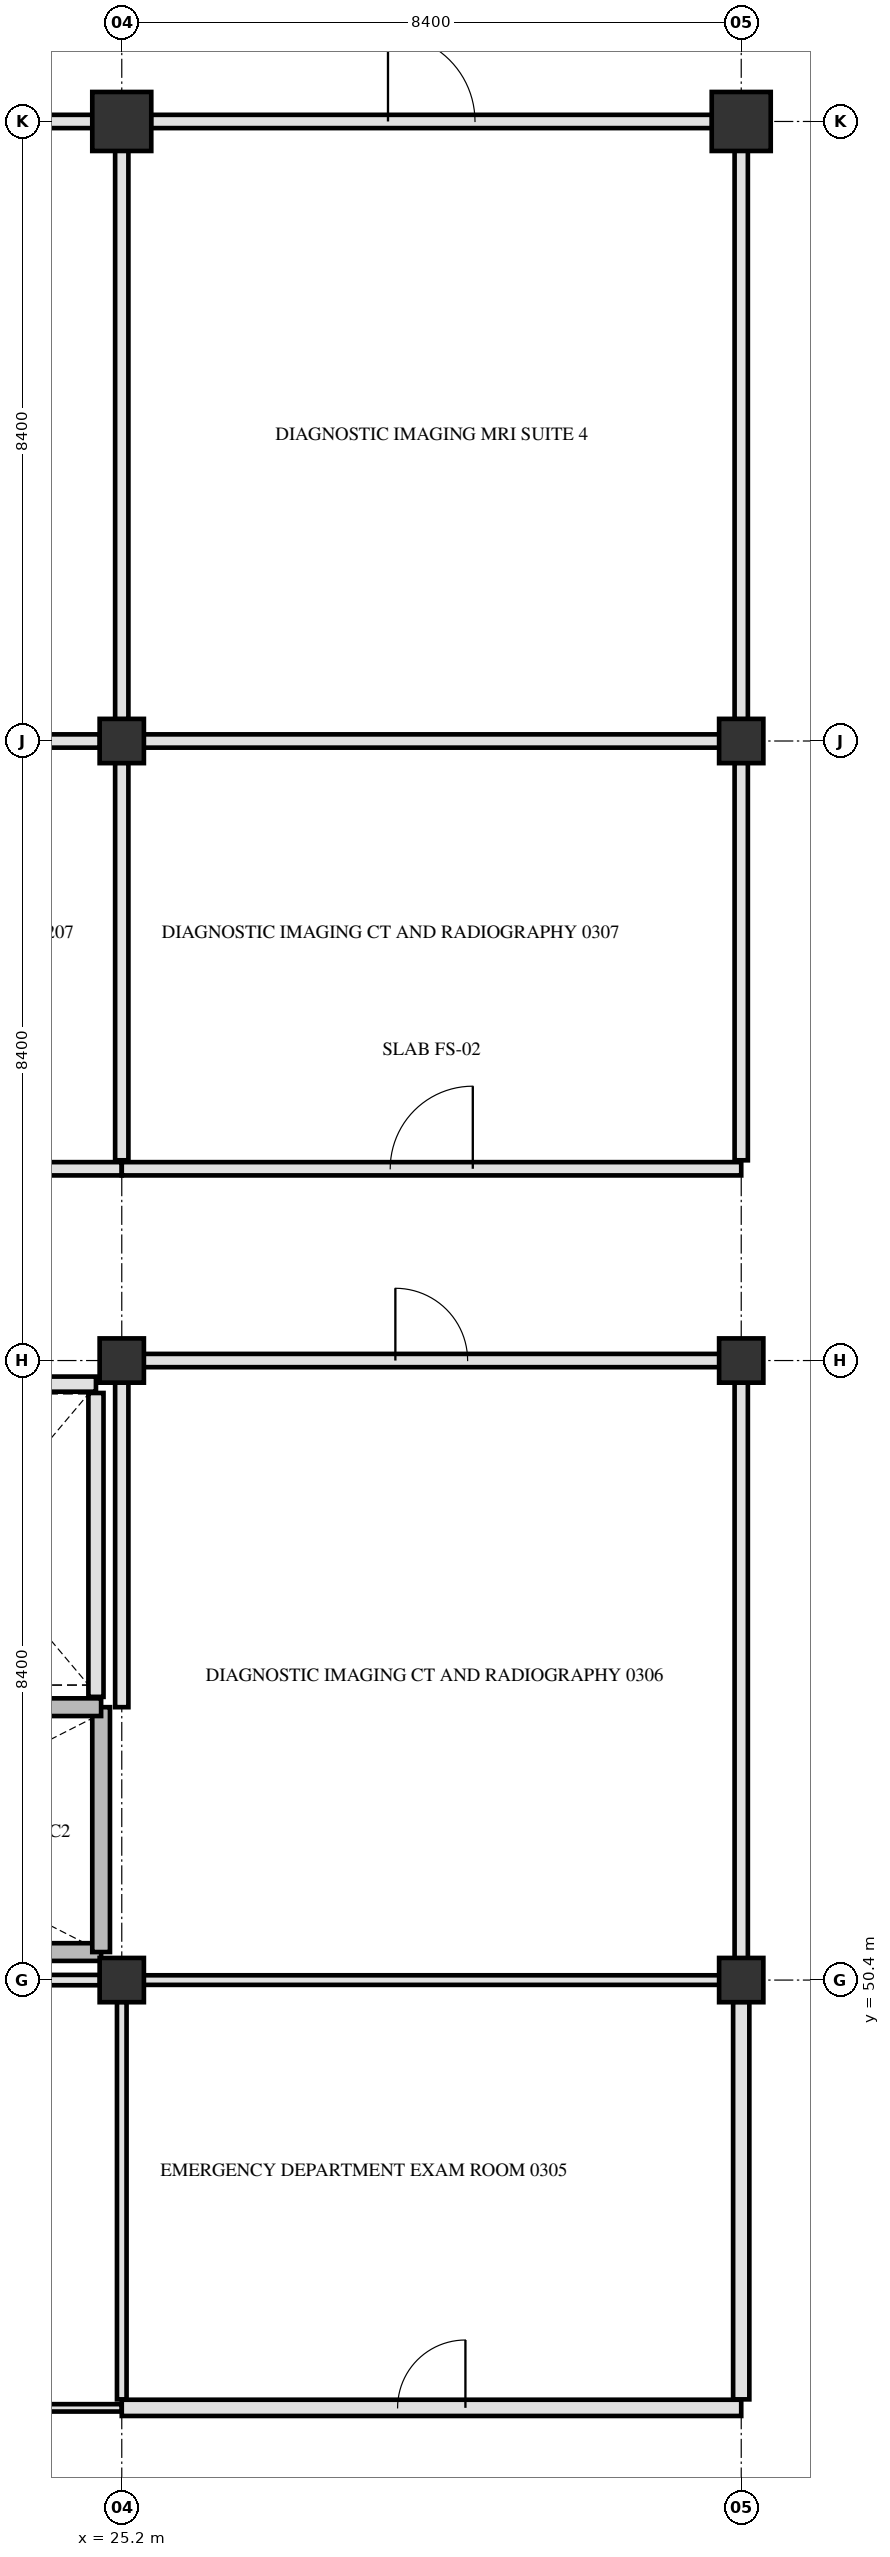
"""IFC4 building model, lengths in metres.
Left out: names, types, materials, properties, quantities, classifications, styles, units other than length and angle.
Written with IfcOpenShell. Run it as: python <this file> out.ifc"""

import sys

from ifc_helpers import new_model, si_unit, direction, frame, frame_2d, origin, origin_2d, place, context, subcontext, project, spatial, rectangle, circle, extrude, element, fill, save


model = new_model("IFC4")
c1 = context("Model", 3, precision=1e-05, world=origin(), true_north=direction((0.0, 1.0)))
c2 = subcontext(c1, "Body", "Model", "MODEL_VIEW")
j1 = project(units=[si_unit("LENGTHUNIT", "METRE"), si_unit("PLANEANGLEUNIT", "RADIAN")], contexts=[c1])
p1 = place(None, origin())
s1 = spatial("IfcSite", under=j1, at=p1, CompositionType="ELEMENT")
p2 = place(p1, origin())
s2 = spatial("IfcBuilding", under=s1, at=p2, CompositionType="ELEMENT")
p3 = place(p2, origin())
s3 = spatial("IfcBuildingStorey", under=s2, at=p3, CompositionType="ELEMENT", Elevation=0.0)
for number, where, z_axis, x_axis in (
    (1, (25.2, 50.4, 0.0), (0.0, 0.0, 1.0), (1.0, 0.0, 0.0)),
    (2, (25.2, 58.8, 0.0), (0.0, 0.0, 1.0), (1.0, 0.0, 0.0)),
    (3, (25.2, 67.2, 0.0), (0.0, 0.0, 1.0), (1.0, 0.0, 0.0)),
):
    element("IfcColumn", number, at=place(p3, frame(where, z_axis=z_axis, x_axis=x_axis)), inside=s3, PredefinedType="COLUMN", context=c2, shape_type="SweptSolid", body=[
        extrude(rectangle(XDim=0.6, YDim=0.6, at=origin_2d()), origin(), (0.0, 0.0, 1.0), 4.8),
    ])
p4 = place(p3, frame((25.2, 75.6, 0.0), z_axis=(0.0, 0.0, 1.0), x_axis=(1.0, 0.0, 0.0)))
e4 = element("IfcColumn", 4, at=p4, inside=s3, PredefinedType="COLUMN", context=c2, shape_type="SweptSolid", body=[
    extrude(circle(Radius=0.4, at=origin_2d()), origin(), (0.0, 0.0, 1.0), 4.8),
])
for number, where, z_axis, x_axis in (
    (5, (33.6, 50.4, 0.0), (0.0, 0.0, 1.0), (1.0, 0.0, 0.0)),
    (6, (33.6, 58.8, 0.0), (0.0, 0.0, 1.0), (1.0, 0.0, 0.0)),
    (7, (33.6, 67.2, 0.0), (0.0, 0.0, 1.0), (1.0, 0.0, 0.0)),
):
    element("IfcColumn", number, at=place(p3, frame(where, z_axis=z_axis, x_axis=x_axis)), inside=s3, PredefinedType="COLUMN", context=c2, shape_type="SweptSolid", body=[
        extrude(rectangle(XDim=0.6, YDim=0.6, at=origin_2d()), origin(), (0.0, 0.0, 1.0), 4.8),
    ])
p5 = place(p3, frame((33.6, 75.6, 0.0), z_axis=(0.0, 0.0, 1.0), x_axis=(1.0, 0.0, 0.0)))
e8 = element("IfcColumn", 8, at=p5, inside=s3, PredefinedType="COLUMN", context=c2, shape_type="SweptSolid", body=[
    extrude(circle(Radius=0.4, at=origin_2d()), origin(), (0.0, 0.0, 1.0), 4.8),
])
p6 = place(p3, frame((17.1, 50.78, 0.0), z_axis=(0.0, 0.0, 1.0), x_axis=(1.0, 0.0, 0.0)))
e9 = element("IfcWall", 9, at=p6, inside=s3, PredefinedType="SHEAR", context=c2, shape_type="SweptSolid", body=[
    extrude(rectangle(XDim=7.82, YDim=0.24, at=frame_2d((3.91, 0.0))), origin(), (0.0, 0.0, 1.0), 4.5),
])
p7 = place(p3, frame((24.92, 50.78, 0.0), z_axis=(0.0, 0.0, 1.0), x_axis=(0.0, 1.0, 0.0)))
e10 = element("IfcWall", 10, at=p7, inside=s3, PredefinedType="SHEAR", context=c2, shape_type="SweptSolid", body=[
    extrude(rectangle(XDim=3.32, YDim=0.24, at=frame_2d((1.66, 0.0))), origin(), (0.0, 0.0, 1.0), 4.5),
])
p8 = place(p3, frame((17.1, 54.1, 0.0), z_axis=(0.0, 0.0, 1.0), x_axis=(1.0, 0.0, 0.0)))
e11 = element("IfcWall", 11, at=p8, inside=s3, PredefinedType="SHEAR", context=c2, shape_type="SweptSolid", body=[
    extrude(rectangle(XDim=7.82, YDim=0.24, at=frame_2d((3.91, 0.0))), origin(), (0.0, 0.0, 1.0), 4.5),
])
p9 = place(p8, frame((0.25, 0.0, 0.0)))
e12 = element("IfcOpeningElement", 12, at=p9, cuts=e11, PredefinedType="OPENING", context=c2, shape_type="SweptSolid", body=[
    extrude(rectangle(XDim=1.45, YDim=2.2, at=frame_2d((0.725, 1.1))), frame((0.0, 0.13, 0.0), z_axis=(0.0, -1.0, 0.0), x_axis=(1.0, 0.0, 0.0)), (0.0, 0.0, 1.0), 0.26),
])
p10 = place(p3, frame((24.85, 54.24, 0.0), z_axis=(0.0, 0.0, 1.0), x_axis=(0.0, 1.0, 0.0)))
e13 = element("IfcWall", 13, at=p10, inside=s3, PredefinedType="PARTITIONING", context=c2, shape_type="SweptSolid", body=[
    extrude(rectangle(XDim=4.12, YDim=0.205, at=frame_2d((2.06, 0.0))), origin(), (0.0, 0.0, 1.0), 4.49),
])
p11 = place(p3, frame((21.28, 58.48, 0.0), z_axis=(0.0, 0.0, 1.0), x_axis=(1.0, 0.0, 0.0)))
e14 = element("IfcWall", 14, at=p11, inside=s3, PredefinedType="PARTITIONING", context=c2, shape_type="SweptSolid", body=[
    extrude(rectangle(XDim=3.57, YDim=0.205, at=frame_2d((1.785, 0.0))), origin(), (0.0, 0.0, 1.0), 3.84),
])
p12 = place(p3, frame((16.8, 44.6, 0.0), z_axis=(0.0, 0.0, 1.0), x_axis=(1.0, 0.0, 0.0)))
e15 = element("IfcWall", 15, at=p12, inside=s3, PredefinedType="PARTITIONING", context=c2, shape_type="SweptSolid", body=[
    extrude(rectangle(XDim=8.4, YDim=0.1, at=frame_2d((4.2, 0.0))), origin(), (0.0, 0.0, 1.0), 3.89),
])
p13 = place(p12, frame((3.6, 0.0, 0.0)))
e16 = element("IfcOpeningElement", 16, at=p13, cuts=e15, PredefinedType="OPENING", context=c2, shape_type="SweptSolid", body=[
    extrude(rectangle(XDim=1.2, YDim=2.15, at=frame_2d((0.6, 1.075))), frame((0.0, 0.06, 0.0), z_axis=(0.0, -1.0, 0.0), x_axis=(1.0, 0.0, 0.0)), (0.0, 0.0, 1.0), 0.12),
])
p14 = place(p3, frame((25.2, 44.6, 0.0), z_axis=(0.0, 0.0, 1.0), x_axis=(1.0, 0.0, 0.0)))
e17 = element("IfcWall", 17, at=p14, inside=s3, PredefinedType="PARTITIONING", context=c2, shape_type="SweptSolid", body=[
    extrude(rectangle(XDim=8.4, YDim=0.22, at=frame_2d((4.2, 0.0))), origin(), (0.0, 0.0, 1.0), 3.89),
])
p15 = place(p14, frame((3.74, 0.0, 0.0)))
e18 = element("IfcOpeningElement", 18, at=p15, cuts=e17, PredefinedType="OPENING", context=c2, shape_type="SweptSolid", body=[
    extrude(rectangle(XDim=0.92, YDim=2.08, at=frame_2d((0.46, 1.04))), frame((0.0, 0.12, 0.0), z_axis=(0.0, -1.0, 0.0), x_axis=(1.0, 0.0, 0.0)), (0.0, 0.0, 1.0), 0.24),
])
p16 = place(p3, frame((17.095, 50.4, 0.0), z_axis=(0.0, 0.0, 1.0), x_axis=(1.0, 0.0, 0.0)))
e19 = element("IfcWall", 19, at=p16, inside=s3, PredefinedType="PARTITIONING", context=c2, shape_type="SweptSolid", body=[
    extrude(rectangle(XDim=7.81, YDim=0.14, at=frame_2d((3.905, 0.0))), origin(), (0.0, 0.0, 1.0), 3.84),
])
p17 = place(p3, frame((25.495, 50.4, 0.0), z_axis=(0.0, 0.0, 1.0), x_axis=(1.0, 0.0, 0.0)))
e20 = element("IfcWall", 20, at=p17, inside=s3, PredefinedType="PARTITIONING", context=c2, shape_type="SweptSolid", body=[
    extrude(rectangle(XDim=7.81, YDim=0.13, at=frame_2d((3.905, 0.0))), origin(), (0.0, 0.0, 1.0), 3.84),
])
p18 = place(p3, frame((25.495, 58.8, 0.0), z_axis=(0.0, 0.0, 1.0), x_axis=(1.0, 0.0, 0.0)))
e21 = element("IfcWall", 21, at=p18, inside=s3, PredefinedType="PARTITIONING", context=c2, shape_type="SweptSolid", body=[
    extrude(rectangle(XDim=7.81, YDim=0.18, at=frame_2d((3.905, 0.0))), origin(), (0.0, 0.0, 1.0), 3.84),
])
p19 = place(p18, frame((3.415, 0.0, 0.0)))
e22 = element("IfcOpeningElement", 22, at=p19, cuts=e21, PredefinedType="OPENING", context=c2, shape_type="SweptSolid", body=[
    extrude(rectangle(XDim=0.98, YDim=2.12, at=frame_2d((0.49, 1.06))), frame((0.0, 0.1, 0.0), z_axis=(0.0, -1.0, 0.0), x_axis=(1.0, 0.0, 0.0)), (0.0, 0.0, 1.0), 0.2),
])
p20 = place(p3, frame((16.8, 61.4, 0.0), z_axis=(0.0, 0.0, 1.0), x_axis=(1.0, 0.0, 0.0)))
e23 = element("IfcWall", 23, at=p20, inside=s3, PredefinedType="PARTITIONING", context=c2, shape_type="SweptSolid", body=[
    extrude(rectangle(XDim=8.4, YDim=0.18, at=frame_2d((4.2, 0.0))), origin(), (0.0, 0.0, 1.0), 3.89),
])
p21 = place(p20, frame((3.575, 0.0, 0.0)))
e24 = element("IfcOpeningElement", 24, at=p21, cuts=e23, PredefinedType="OPENING", context=c2, shape_type="SweptSolid", body=[
    extrude(rectangle(XDim=1.25, YDim=2.2, at=frame_2d((0.625, 1.1))), frame((0.0, 0.1, 0.0), z_axis=(0.0, -1.0, 0.0), x_axis=(1.0, 0.0, 0.0)), (0.0, 0.0, 1.0), 0.2),
])
p22 = place(p3, frame((25.2, 61.4, 0.0), z_axis=(0.0, 0.0, 1.0), x_axis=(1.0, 0.0, 0.0)))
e25 = element("IfcWall", 25, at=p22, inside=s3, PredefinedType="PARTITIONING", context=c2, shape_type="SweptSolid", body=[
    extrude(rectangle(XDim=8.4, YDim=0.18, at=frame_2d((4.2, 0.0))), origin(), (0.0, 0.0, 1.0), 3.89),
])
p23 = place(p22, frame((3.64, 0.0, 0.0)))
e26 = element("IfcOpeningElement", 26, at=p23, cuts=e25, PredefinedType="OPENING", context=c2, shape_type="SweptSolid", body=[
    extrude(rectangle(XDim=1.12, YDim=2.18, at=frame_2d((0.56, 1.09))), frame((0.0, 0.1, 0.0), z_axis=(0.0, -1.0, 0.0), x_axis=(1.0, 0.0, 0.0)), (0.0, 0.0, 1.0), 0.2),
])
p24 = place(p3, frame((17.095, 67.2, 0.0), z_axis=(0.0, 0.0, 1.0), x_axis=(1.0, 0.0, 0.0)))
e27 = element("IfcWall", 27, at=p24, inside=s3, PredefinedType="PARTITIONING", context=c2, shape_type="SweptSolid", body=[
    extrude(rectangle(XDim=7.81, YDim=0.18, at=frame_2d((3.905, 0.0))), origin(), (0.0, 0.0, 1.0), 3.84),
])
p25 = place(p3, frame((25.495, 67.2, 0.0), z_axis=(0.0, 0.0, 1.0), x_axis=(1.0, 0.0, 0.0)))
e28 = element("IfcWall", 28, at=p25, inside=s3, PredefinedType="PARTITIONING", context=c2, shape_type="SweptSolid", body=[
    extrude(rectangle(XDim=7.81, YDim=0.18, at=frame_2d((3.905, 0.0))), origin(), (0.0, 0.0, 1.0), 3.84),
])
p26 = place(p3, frame((17.195, 75.6, 0.0), z_axis=(0.0, 0.0, 1.0), x_axis=(1.0, 0.0, 0.0)))
e29 = element("IfcWall", 29, at=p26, inside=s3, PredefinedType="PARTITIONING", context=c2, shape_type="SweptSolid", body=[
    extrude(rectangle(XDim=7.61, YDim=0.18, at=frame_2d((3.805, 0.0))), origin(), (0.0, 0.0, 1.0), 3.84),
])
p27 = place(p26, frame((3.155, 0.0, 0.0)))
e30 = element("IfcOpeningElement", 30, at=p27, cuts=e29, PredefinedType="OPENING", context=c2, shape_type="SweptSolid", body=[
    extrude(rectangle(XDim=1.3, YDim=2.2, at=frame_2d((0.65, 1.1))), frame((0.0, 0.1, 0.0), z_axis=(0.0, -1.0, 0.0), x_axis=(1.0, 0.0, 0.0)), (0.0, 0.0, 1.0), 0.2),
])
p28 = place(p3, frame((25.595, 75.6, 0.0), z_axis=(0.0, 0.0, 1.0), x_axis=(1.0, 0.0, 0.0)))
e31 = element("IfcWall", 31, at=p28, inside=s3, PredefinedType="PARTITIONING", context=c2, shape_type="SweptSolid", body=[
    extrude(rectangle(XDim=7.61, YDim=0.18, at=frame_2d((3.805, 0.0))), origin(), (0.0, 0.0, 1.0), 3.84),
])
p29 = place(p28, frame((3.215, 0.0, 0.0)))
e32 = element("IfcOpeningElement", 32, at=p29, cuts=e31, PredefinedType="OPENING", context=c2, shape_type="SweptSolid", body=[
    extrude(rectangle(XDim=1.18, YDim=2.18, at=frame_2d((0.59, 1.09))), frame((0.0, 0.1, 0.0), z_axis=(0.0, -1.0, 0.0), x_axis=(1.0, 0.0, 0.0)), (0.0, 0.0, 1.0), 0.2),
])
p30 = place(p3, frame((25.2, 44.715, 0.0), z_axis=(0.0, 0.0, 1.0), x_axis=(0.0, 1.0, 0.0)))
e33 = element("IfcWall", 33, at=p30, inside=s3, PredefinedType="PARTITIONING", context=c2, shape_type="SweptSolid", body=[
    extrude(rectangle(XDim=5.39, YDim=0.13, at=frame_2d((2.695, 0.0))), origin(), (0.0, 0.0, 1.0), 3.89),
])
p31 = place(p3, frame((25.2, 54.1, 0.0), z_axis=(0.0, 0.0, 1.0), x_axis=(0.0, 1.0, 0.0)))
e34 = element("IfcWall", 34, at=p31, inside=s3, PredefinedType="PARTITIONING", context=c2, shape_type="SweptSolid", body=[
    extrude(rectangle(XDim=4.405, YDim=0.18, at=frame_2d((2.202, 0.0))), origin(), (0.0, 0.0, 1.0), 3.89),
])
p32 = place(p3, frame((25.2, 61.515, 0.0), z_axis=(0.0, 0.0, 1.0), x_axis=(0.0, 1.0, 0.0)))
e35 = element("IfcWall", 35, at=p32, inside=s3, PredefinedType="PARTITIONING", context=c2, shape_type="SweptSolid", body=[
    extrude(rectangle(XDim=5.39, YDim=0.18, at=frame_2d((2.695, 0.0))), origin(), (0.0, 0.0, 1.0), 3.89),
])
p33 = place(p3, frame((25.2, 67.495, 0.0), z_axis=(0.0, 0.0, 1.0), x_axis=(0.0, 1.0, 0.0)))
e36 = element("IfcWall", 36, at=p33, inside=s3, PredefinedType="PARTITIONING", context=c2, shape_type="SweptSolid", body=[
    extrude(rectangle(XDim=7.71, YDim=0.18, at=frame_2d((3.855, 0.0))), origin(), (0.0, 0.0, 1.0), 3.89),
])
p34 = place(p3, frame((33.6, 44.715, 0.0), z_axis=(0.0, 0.0, 1.0), x_axis=(0.0, 1.0, 0.0)))
e37 = element("IfcWall", 37, at=p34, inside=s3, PredefinedType="PARTITIONING", context=c2, shape_type="SweptSolid", body=[
    extrude(rectangle(XDim=5.39, YDim=0.22, at=frame_2d((2.695, 0.0))), origin(), (0.0, 0.0, 1.0), 3.89),
])
p35 = place(p3, frame((33.6, 50.695, 0.0), z_axis=(0.0, 0.0, 1.0), x_axis=(0.0, 1.0, 0.0)))
e38 = element("IfcWall", 38, at=p35, inside=s3, PredefinedType="PARTITIONING", context=c2, shape_type="SweptSolid", body=[
    extrude(rectangle(XDim=7.81, YDim=0.18, at=frame_2d((3.905, 0.0))), origin(), (0.0, 0.0, 1.0), 3.89),
])
p36 = place(p3, frame((33.6, 61.515, 0.0), z_axis=(0.0, 0.0, 1.0), x_axis=(0.0, 1.0, 0.0)))
e39 = element("IfcWall", 39, at=p36, inside=s3, PredefinedType="PARTITIONING", context=c2, shape_type="SweptSolid", body=[
    extrude(rectangle(XDim=5.39, YDim=0.18, at=frame_2d((2.695, 0.0))), origin(), (0.0, 0.0, 1.0), 3.89),
])
p37 = place(p3, frame((33.6, 67.495, 0.0), z_axis=(0.0, 0.0, 1.0), x_axis=(0.0, 1.0, 0.0)))
e40 = element("IfcWall", 40, at=p37, inside=s3, PredefinedType="PARTITIONING", context=c2, shape_type="SweptSolid", body=[
    extrude(rectangle(XDim=7.71, YDim=0.18, at=frame_2d((3.855, 0.0))), origin(), (0.0, 0.0, 1.0), 3.89),
])
p38 = place(p15, origin())
e41 = element("IfcDoor", 41, at=p38, inside=s3, OperationType="SINGLE_SWING_RIGHT", PredefinedType="DOOR", context=c2, shape_type="SweptSolid", body=[
    extrude(rectangle(XDim=0.92, YDim=2.08, at=frame_2d((0.46, 1.04))), frame((0.0, 0.025, 0.0), z_axis=(0.0, -1.0, 0.0), x_axis=(1.0, 0.0, 0.0)), (0.0, 0.0, 1.0), 0.05),
])
fill(e18, e41)
p39 = place(p19, origin())
e42 = element("IfcDoor", 42, at=p39, inside=s3, OperationType="SINGLE_SWING_LEFT", PredefinedType="DOOR", context=c2, shape_type="SweptSolid", body=[
    extrude(rectangle(XDim=0.98, YDim=2.12, at=frame_2d((0.49, 1.06))), frame((0.0, 0.025, 0.0), z_axis=(0.0, -1.0, 0.0), x_axis=(1.0, 0.0, 0.0)), (0.0, 0.0, 1.0), 0.05),
])
fill(e22, e42)
p40 = place(p23, origin())
e43 = element("IfcDoor", 43, at=p40, inside=s3, OperationType="SINGLE_SWING_RIGHT", PredefinedType="DOOR", context=c2, shape_type="SweptSolid", body=[
    extrude(rectangle(XDim=1.12, YDim=2.18, at=frame_2d((0.56, 1.09))), frame((0.0, 0.025, 0.0), z_axis=(0.0, -1.0, 0.0), x_axis=(1.0, 0.0, 0.0)), (0.0, 0.0, 1.0), 0.05),
])
fill(e26, e43)
p41 = place(p29, origin())
e44 = element("IfcDoor", 44, at=p41, inside=s3, OperationType="SINGLE_SWING_LEFT", PredefinedType="DOOR", context=c2, shape_type="SweptSolid", body=[
    extrude(rectangle(XDim=1.18, YDim=2.18, at=frame_2d((0.59, 1.09))), frame((0.0, 0.025, 0.0), z_axis=(0.0, -1.0, 0.0), x_axis=(1.0, 0.0, 0.0)), (0.0, 0.0, 1.0), 0.05),
])
fill(e32, e44)
save(model, sys.argv[1])
